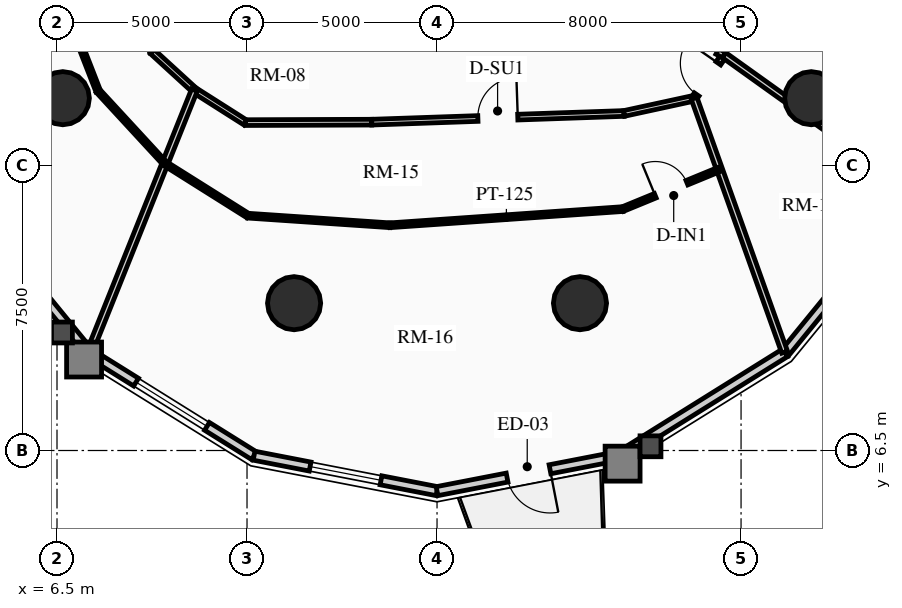
"""IFC4 building model, lengths in metres.
Left out: names, types, materials, properties, quantities, classifications, styles, units other than length and angle.
Written with IfcOpenShell. Run it as: python <this file> out.ifc"""

import sys

from ifc_helpers import new_model, si_unit, direction, frame, frame_2d, origin, origin_2d, place, context, subcontext, project, spatial, rectangle, circle, extrude, source, transform, mapped, element, fill, save


model = new_model("IFC4")
c1 = context("Model", 3, precision=1e-05, world=origin(), true_north=direction((0.0, 1.0)))
c2 = subcontext(c1, "Body", "Model", "MODEL_VIEW")
j1 = project(units=[si_unit("LENGTHUNIT", "METRE"), si_unit("PLANEANGLEUNIT", "RADIAN")], contexts=[c1])
p1 = place(None, origin())
s1 = spatial("IfcSite", under=j1, at=p1, CompositionType="ELEMENT")
p2 = place(p1, origin())
s2 = spatial("IfcBuilding", under=s1, at=p2, CompositionType="ELEMENT")
p3 = place(p2, frame((0.0, 0.0, 110.89)))
s3 = spatial("IfcBuildingStorey", under=s2, at=p3, CompositionType="ELEMENT", Elevation=110.89)
for number, where, z_axis, x_axis in (
    (1, (6.653, 15.771, 0.0), (0.0, 0.0, 1.0), (1.0, 0.0, 0.0)),
    (2, (12.739, 10.377, 0.0), (0.0, 0.0, 1.0), (1.0, 0.0, 0.0)),
    (3, (20.261, 10.377, 0.0), (0.0, 0.0, 1.0), (1.0, 0.0, 0.0)),
    (4, (26.347, 15.771, 0.0), (0.0, 0.0, 1.0), (1.0, 0.0, 0.0)),
):
    element("IfcColumn", number, at=place(p3, frame(where, z_axis=z_axis, x_axis=x_axis)), inside=s3, PredefinedType="USERDEFINED", context=c2, shape_type="SweptSolid", body=[
        extrude(circle(Radius=0.7, at=origin_2d()), origin(), (0.0, 0.0, 1.0), 2.91),
    ])
p4 = place(p3, frame((7.342, 9.072, 0.0), z_axis=(0.0, 0.0, 1.0), x_axis=(-0.632700781152, 0.77439635945, 0.0)))
e5 = element("IfcWall", 5, at=p4, inside=s3, PredefinedType="SOLIDWALL", context=c2, shape_type="SweptSolid", body=[
    extrude(rectangle(XDim=5.448, YDim=0.24, at=frame_2d((2.724, 0.0))), origin(), (0.0, 0.0, 1.0), 2.179),
])
p5 = place(p3, frame((11.685, 6.363, 0.0), z_axis=(0.0, 0.0, 1.0), x_axis=(-0.848520380187, 0.529162701263, 0.0)))
e6 = element("IfcWall", 6, at=p5, inside=s3, PredefinedType="SOLIDWALL", context=c2, shape_type="SweptSolid", body=[
    extrude(rectangle(XDim=5.119, YDim=0.24, at=frame_2d((2.56, 0.0))), origin(), (0.0, 0.0, 1.0), 2.179),
])
m1 = source(origin(), c2, "Body", "SweptSolid", [
    extrude(rectangle(XDim=2.2, YDim=1.35, at=frame_2d((1.1, 0.675))), frame((0.0, 0.13, 0.0), z_axis=(0.0, -1.0, 0.0), x_axis=(1.0, 0.0, 0.0)), (0.0, 0.0, 1.0), 0.26),
])
p6 = place(p5, frame((1.459, 0.0, 0.65)))
e7 = element("IfcOpeningElement", 7, at=p6, cuts=e6, PredefinedType="OPENING", context=c2, shape_type="MappedRepresentation", body=[
    mapped(m1, transform((0.0, 0.0, 0.0), x_axis=(1.0, 0.0, 0.0), y_axis=(0.0, 1.0, 0.0), z_axis=(0.0, 0.0, 1.0), scale=1.0)),
])
p7 = place(p3, frame((16.5, 5.43, 0.0), z_axis=(0.0, 0.0, 1.0), x_axis=(-0.981723785992, 0.190311344954, 0.0)))
e8 = element("IfcWall", 8, at=p7, inside=s3, PredefinedType="SOLIDWALL", context=c2, shape_type="SweptSolid", body=[
    extrude(rectangle(XDim=4.904, YDim=0.24, at=frame_2d((2.452, 0.0))), origin(), (0.0, 0.0, 1.0), 2.179),
])
m2 = source(origin(), c2, "Body", "SweptSolid", [
    extrude(rectangle(XDim=1.9, YDim=1.35, at=frame_2d((0.95, 0.675))), frame((0.0, 0.13, 0.0), z_axis=(0.0, -1.0, 0.0), x_axis=(1.0, 0.0, 0.0)), (0.0, 0.0, 1.0), 0.26),
])
p8 = place(p7, frame((1.502, 0.0, 0.65)))
e9 = element("IfcOpeningElement", 9, at=p8, cuts=e8, PredefinedType="OPENING", context=c2, shape_type="MappedRepresentation", body=[
    mapped(m2, transform((0.0, 0.0, 0.0), x_axis=(1.0, 0.0, 0.0), y_axis=(0.0, 1.0, 0.0), z_axis=(0.0, 0.0, 1.0), scale=1.0)),
])
p9 = place(p3, frame((21.315, 6.363, 0.0), z_axis=(0.0, 0.0, 1.0), x_axis=(-0.981723785992, -0.190311344954, 0.0)))
e10 = element("IfcWall", 10, at=p9, inside=s3, PredefinedType="SOLIDWALL", context=c2, shape_type="SweptSolid", body=[
    extrude(rectangle(XDim=4.904, YDim=0.24, at=frame_2d((2.452, 0.0))), origin(), (0.0, 0.0, 1.0), 2.179),
])
m3 = source(origin(), c2, "Body", "SweptSolid", [
    extrude(rectangle(XDim=1.15, YDim=2.005, at=frame_2d((0.575, 1.002))), frame((0.0, 0.13, 0.0), z_axis=(0.0, -1.0, 0.0), x_axis=(1.0, 0.0, 0.0)), (0.0, 0.0, 1.0), 0.26),
])
p10 = place(p9, frame((1.877, 0.0, 0.0)))
e11 = element("IfcOpeningElement", 11, at=p10, cuts=e10, PredefinedType="OPENING", context=c2, shape_type="MappedRepresentation", body=[
    mapped(m3, transform((0.0, 0.0, 0.0), x_axis=(1.0, 0.0, 0.0), y_axis=(0.0, 1.0, 0.0), z_axis=(0.0, 0.0, 1.0), scale=1.0)),
])
p11 = place(p3, frame((25.658, 9.072, 0.0), z_axis=(0.0, 0.0, 1.0), x_axis=(-0.848520380187, -0.529162701263, 0.0)))
e12 = element("IfcWall", 12, at=p11, inside=s3, PredefinedType="SOLIDWALL", context=c2, shape_type="SweptSolid", body=[
    extrude(rectangle(XDim=5.119, YDim=0.24, at=frame_2d((2.56, 0.0))), origin(), (0.0, 0.0, 1.0), 2.179),
])
p12 = place(p3, frame((29.105, 13.291, 0.0), z_axis=(0.0, 0.0, 1.0), x_axis=(-0.632700781152, -0.77439635945, 0.0)))
e13 = element("IfcWall", 13, at=p12, inside=s3, PredefinedType="SOLIDWALL", context=c2, shape_type="SweptSolid", body=[
    extrude(rectangle(XDim=5.448, YDim=0.24, at=frame_2d((2.724, 0.0))), origin(), (0.0, 0.0, 1.0), 2.179),
])
p13 = place(p12, frame((1.774, 0.0, 0.65)))
e14 = element("IfcOpeningElement", 14, at=p13, cuts=e13, PredefinedType="OPENING", context=c2, shape_type="MappedRepresentation", body=[
    mapped(m2, transform((0.0, 0.0, 0.0), x_axis=(1.0, 0.0, 0.0), y_axis=(0.0, 1.0, 0.0), z_axis=(0.0, 0.0, 1.0), scale=1.0)),
])
p14 = place(p3, frame((8.538, 18.338, 0.0), z_axis=(0.0, 0.0, 1.0), x_axis=(0.331358150167, -0.94350504838, 0.0)))
e15 = element("IfcWall", 15, at=p14, inside=s3, PredefinedType="PARTITIONING", context=c2, shape_type="SweptSolid", body=[
    extrude(rectangle(XDim=1.424, YDim=0.15, at=frame_2d((0.712, 0.0))), origin(), (0.0, 0.0, 1.0), 2.225),
])
m4 = source(origin(), c2, "Body", "SweptSolid", [
    extrude(rectangle(XDim=1.05, YDim=2.015, at=frame_2d((0.525, 1.007))), frame((0.0, 0.085, 0.0), z_axis=(0.0, -1.0, 0.0), x_axis=(1.0, 0.0, 0.0)), (0.0, 0.0, 1.0), 0.17),
])
p15 = place(p14, frame((0.12, 0.0, 0.0)))
e16 = element("IfcOpeningElement", 16, at=p15, cuts=e15, PredefinedType="OPENING", context=c2, shape_type="MappedRepresentation", body=[
    mapped(m4, transform((0.0, 0.0, 0.0), x_axis=(1.0, 0.0, 0.0), y_axis=(0.0, 1.0, 0.0), z_axis=(0.0, 0.0, 1.0), scale=1.0)),
])
p16 = place(p3, frame((9.01, 16.994, 0.0), z_axis=(0.0, 0.0, 1.0), x_axis=(0.737701798986, -0.67512669609, 0.0)))
e17 = element("IfcWall", 17, at=p16, inside=s3, PredefinedType="PARTITIONING", context=c2, shape_type="SweptSolid", body=[
    extrude(rectangle(XDim=1.498, YDim=0.15, at=frame_2d((0.749, 0.0))), origin(), (0.0, 0.0, 1.0), 2.225),
])
p17 = place(p3, frame((10.115, 15.983, 0.0), z_axis=(0.0, 0.0, 1.0), x_axis=(0.843995849351, -0.536349705209, 0.0)))
e18 = element("IfcWall", 18, at=p17, inside=s3, PredefinedType="PARTITIONING", context=c2, shape_type="SweptSolid", body=[
    extrude(rectangle(XDim=1.593, YDim=0.15, at=frame_2d((0.796, 0.0))), origin(), (0.0, 0.0, 1.0), 2.225),
])
p18 = place(p3, frame((11.46, 15.129, 0.0), z_axis=(0.0, 0.0, 1.0), x_axis=(0.999993513287, 0.003601858435, 0.0)))
e19 = element("IfcWall", 19, at=p18, inside=s3, PredefinedType="PARTITIONING", context=c2, shape_type="SweptSolid", body=[
    extrude(rectangle(XDim=3.321, YDim=0.15, at=frame_2d((1.661, 0.0))), origin(), (0.0, 0.0, 1.0), 2.225),
])
p19 = place(p3, frame((14.781, 15.141, 0.0), z_axis=(0.0, 0.0, 1.0), x_axis=(0.999407918707, 0.034406569513, 0.0)))
e20 = element("IfcWall", 20, at=p19, inside=s3, PredefinedType="PARTITIONING", context=c2, shape_type="SweptSolid", body=[
    extrude(rectangle(XDim=6.642, YDim=0.15, at=frame_2d((3.321, 0.0))), origin(), (0.0, 0.0, 1.0), 2.225),
])
p20 = place(p19, frame((2.796, 0.0, 0.0)))
e21 = element("IfcOpeningElement", 21, at=p20, cuts=e20, PredefinedType="OPENING", context=c2, shape_type="MappedRepresentation", body=[
    mapped(m4, transform((0.0, 0.0, 0.0), x_axis=(1.0, 0.0, 0.0), y_axis=(0.0, 1.0, 0.0), z_axis=(0.0, 0.0, 1.0), scale=1.0)),
])
p21 = place(p3, frame((21.419, 15.369, 0.0), z_axis=(0.0, 0.0, 1.0), x_axis=(0.977192701953, 0.212354475464, 0.0)))
e22 = element("IfcWall", 22, at=p21, inside=s3, PredefinedType="PARTITIONING", context=c2, shape_type="SweptSolid", body=[
    extrude(rectangle(XDim=1.888, YDim=0.15, at=frame_2d((0.944, 0.0))), origin(), (0.0, 0.0, 1.0), 2.225),
])
p22 = place(p3, frame((23.263, 15.77, 0.0), z_axis=(0.0, 0.0, 1.0), x_axis=(0.570743456919, 0.821128434768, 0.0)))
e23 = element("IfcWall", 23, at=p22, inside=s3, PredefinedType="PARTITIONING", context=c2, shape_type="SweptSolid", body=[
    extrude(rectangle(XDim=1.382, YDim=0.15, at=frame_2d((0.691, 0.0))), origin(), (0.0, 0.0, 1.0), 2.225),
])
m5 = source(origin(), c2, "Body", "SweptSolid", [
    extrude(rectangle(XDim=1.0, YDim=2.015, at=frame_2d((0.5, 1.007))), frame((0.0, 0.085, 0.0), z_axis=(0.0, -1.0, 0.0), x_axis=(1.0, 0.0, 0.0)), (0.0, 0.0, 1.0), 0.17),
])
p23 = place(p22, frame((0.12, 0.0, 0.0)))
e24 = element("IfcOpeningElement", 24, at=p23, cuts=e23, PredefinedType="OPENING", context=c2, shape_type="MappedRepresentation", body=[
    mapped(m5, transform((0.0, 0.0, 0.0), x_axis=(1.0, 0.0, 0.0), y_axis=(0.0, 1.0, 0.0), z_axis=(0.0, 0.0, 1.0), scale=1.0)),
])
p24 = place(p3, frame((10.115, 15.983, 0.0), z_axis=(0.0, 0.0, 1.0), x_axis=(-0.371861013147, -0.928288417951, 0.0)))
e25 = element("IfcWall", 25, at=p24, inside=s3, PredefinedType="PARTITIONING", context=c2, shape_type="SweptSolid", body=[
    extrude(rectangle(XDim=7.427, YDim=0.16, at=frame_2d((3.714, 0.0))), origin(), (0.0, 0.0, 1.0), 2.179),
])
p25 = place(p3, frame((23.263, 15.77, 0.0), z_axis=(0.0, 0.0, 1.0), x_axis=(0.335919964206, -0.941890533793, 0.0)))
e26 = element("IfcWall", 26, at=p25, inside=s3, PredefinedType="PARTITIONING", context=c2, shape_type="SweptSolid", body=[
    extrude(rectangle(XDim=7.094, YDim=0.16, at=frame_2d((3.547, 0.0))), origin(), (0.0, 0.0, 1.0), 2.179),
])
p26 = place(p3, frame((24.052, 16.905, 0.0), z_axis=(0.0, 0.0, 1.0), x_axis=(0.813437670746, -0.581652091727, 0.0)))
e27 = element("IfcWall", 27, at=p26, inside=s3, PredefinedType="PARTITIONING", context=c2, shape_type="SweptSolid", body=[
    extrude(rectangle(XDim=6.192, YDim=0.16, at=frame_2d((3.096, 0.0))), origin(), (0.0, 0.0, 1.0), 2.179),
])
p27 = place(p3, frame((22.075, 17.975, 0.0), z_axis=(0.0, 0.0, 1.0), x_axis=(0.879356383302, -0.476164206073, 0.0)))
e28 = element("IfcWall", 28, at=p27, inside=s3, PredefinedType="PARTITIONING", context=c2, shape_type="SweptSolid", body=[
    extrude(rectangle(XDim=2.248, YDim=0.16, at=frame_2d((1.124, 0.0))), origin(), (0.0, 0.0, 1.0), 2.225),
])
m6 = source(origin(), c2, "Body", "SweptSolid", [
    extrude(rectangle(XDim=1.05, YDim=2.015, at=frame_2d((0.525, 1.007))), frame((0.0, 0.09, 0.0), z_axis=(0.0, -1.0, 0.0), x_axis=(1.0, 0.0, 0.0)), (0.0, 0.0, 1.0), 0.18),
])
p28 = place(p27, frame((0.998, 0.0, 0.0)))
e29 = element("IfcOpeningElement", 29, at=p28, cuts=e28, PredefinedType="OPENING", context=c2, shape_type="MappedRepresentation", body=[
    mapped(m6, transform((0.0, 0.0, 0.0), x_axis=(1.0, 0.0, 0.0), y_axis=(0.0, 1.0, 0.0), z_axis=(0.0, 0.0, 1.0), scale=1.0)),
])
p29 = place(p3, frame((6.624, 18.415, 0.0), z_axis=(0.0, 0.0, 1.0), x_axis=(0.363854295337, -0.931455877519, 0.0)))
e30 = element("IfcWall", 30, at=p29, inside=s3, PredefinedType="PARTITIONING", context=c2, shape_type="SweptSolid", body=[
    extrude(rectangle(XDim=2.635, YDim=0.125, at=frame_2d((1.317, 0.0))), origin(), (0.0, 0.0, 1.0), 2.225),
])
p30 = place(p3, frame((7.583, 15.961, 0.0), z_axis=(0.0, 0.0, 1.0), x_axis=(0.677838563189, -0.735210774032, 0.0)))
e31 = element("IfcWall", 31, at=p30, inside=s3, PredefinedType="PARTITIONING", context=c2, shape_type="SweptSolid", body=[
    extrude(rectangle(XDim=2.596, YDim=0.125, at=frame_2d((1.298, 0.0))), origin(), (0.0, 0.0, 1.0), 2.655),
])
p31 = place(p3, frame((9.342, 14.052, 0.0), z_axis=(0.0, 0.0, 1.0), x_axis=(0.846526826244, -0.532346064557, 0.0)))
e32 = element("IfcWall", 32, at=p31, inside=s3, PredefinedType="PARTITIONING", context=c2, shape_type="SweptSolid", body=[
    extrude(rectangle(XDim=2.578, YDim=0.125, at=frame_2d((1.289, 0.0))), origin(), (0.0, 0.0, 1.0), 2.225),
])
p32 = place(p3, frame((11.525, 12.68, 0.0), z_axis=(0.0, 0.0, 1.0), x_axis=(0.997726815836, -0.067388433443, 0.0)))
e33 = element("IfcWall", 33, at=p32, inside=s3, PredefinedType="PARTITIONING", context=c2, shape_type="SweptSolid", body=[
    extrude(rectangle(XDim=3.746, YDim=0.125, at=frame_2d((1.873, 0.0))), origin(), (0.0, 0.0, 1.0), 2.225),
])
p33 = place(p3, frame((15.262, 12.427, 0.0), z_axis=(0.0, 0.0, 1.0), x_axis=(0.997595855995, 0.069300130605, 0.0)))
e34 = element("IfcWall", 34, at=p33, inside=s3, PredefinedType="PARTITIONING", context=c2, shape_type="SweptSolid", body=[
    extrude(rectangle(XDim=6.14, YDim=0.125, at=frame_2d((3.07, 0.0))), origin(), (0.0, 0.0, 1.0), 2.225),
])
p34 = place(p3, frame((21.388, 12.853, 0.0), z_axis=(0.0, 0.0, 1.0), x_axis=(0.924757149715, 0.380557767036, 0.0)))
e35 = element("IfcWall", 35, at=p34, inside=s3, PredefinedType="PARTITIONING", context=c2, shape_type="SweptSolid", body=[
    extrude(rectangle(XDim=2.75, YDim=0.125, at=frame_2d((1.375, 0.0))), origin(), (0.0, 0.0, 1.0), 2.179),
])
m7 = source(origin(), c2, "Body", "SweptSolid", [
    extrude(rectangle(XDim=0.9, YDim=2.005, at=frame_2d((0.45, 1.002))), frame((0.0, 0.073, 0.0), z_axis=(0.0, -1.0, 0.0), x_axis=(1.0, 0.0, 0.0)), (0.0, 0.0, 1.0), 0.145),
])
p35 = place(p34, frame((0.925, 0.0, 0.0)))
e36 = element("IfcOpeningElement", 36, at=p35, cuts=e35, PredefinedType="OPENING", context=c2, shape_type="MappedRepresentation", body=[
    mapped(m7, transform((0.0, 0.0, 0.0), x_axis=(1.0, 0.0, 0.0), y_axis=(0.0, 1.0, 0.0), z_axis=(0.0, 0.0, 1.0), scale=1.0)),
])
m8 = source(origin(), c2, "Body", "SweptSolid", [
    extrude(rectangle(XDim=2.2, YDim=1.35, at=frame_2d((1.1, 0.675))), frame((0.0, 0.03, 0.0), z_axis=(0.0, -1.0, 0.0), x_axis=(1.0, 0.0, 0.0)), (0.0, 0.0, 1.0), 0.06),
])
p36 = place(p6, origin())
e37 = element("IfcWindow", 37, at=p36, inside=s3, PartitioningType="DOUBLE_PANEL_VERTICAL", PredefinedType="WINDOW", context=c2, shape_type="MappedRepresentation", body=[
    mapped(m8, transform((0.0, 0.0, 0.0), x_axis=(1.0, 0.0, 0.0), y_axis=(0.0, 1.0, 0.0), z_axis=(0.0, 0.0, 1.0), scale=1.0)),
])
fill(e7, e37)
m9 = source(origin(), c2, "Body", "SweptSolid", [
    extrude(rectangle(XDim=1.9, YDim=1.35, at=frame_2d((0.95, 0.675))), frame((0.0, 0.03, 0.0), z_axis=(0.0, -1.0, 0.0), x_axis=(1.0, 0.0, 0.0)), (0.0, 0.0, 1.0), 0.06),
])
p37 = place(p8, origin())
e38 = element("IfcWindow", 38, at=p37, inside=s3, PartitioningType="DOUBLE_PANEL_VERTICAL", PredefinedType="WINDOW", context=c2, shape_type="MappedRepresentation", body=[
    mapped(m9, transform((0.0, 0.0, 0.0), x_axis=(1.0, 0.0, 0.0), y_axis=(0.0, 1.0, 0.0), z_axis=(0.0, 0.0, 1.0), scale=1.0)),
])
fill(e9, e38)
m10 = source(origin(), c2, "Body", "SweptSolid", [
    extrude(rectangle(XDim=1.15, YDim=2.005, at=frame_2d((0.575, 1.002))), frame((0.0, 0.025, 0.0), z_axis=(0.0, -1.0, 0.0), x_axis=(1.0, 0.0, 0.0)), (0.0, 0.0, 1.0), 0.05),
])
p38 = place(p10, origin())
e39 = element("IfcDoor", 39, at=p38, inside=s3, OperationType="SINGLE_SWING_LEFT", PredefinedType="DOOR", context=c2, shape_type="MappedRepresentation", body=[
    mapped(m10, transform((0.0, 0.0, 0.0), x_axis=(1.0, 0.0, 0.0), y_axis=(0.0, 1.0, 0.0), z_axis=(0.0, 0.0, 1.0), scale=1.0)),
])
fill(e11, e39)
m11 = source(origin(), c2, "Body", "SweptSolid", [
    extrude(rectangle(XDim=1.05, YDim=2.015, at=frame_2d((0.525, 1.007))), frame((0.0, 0.025, 0.0), z_axis=(0.0, -1.0, 0.0), x_axis=(1.0, 0.0, 0.0)), (0.0, 0.0, 1.0), 0.05),
])
p39 = place(p28, origin())
e40 = element("IfcDoor", 40, at=p39, inside=s3, OperationType="SINGLE_SWING_RIGHT", PredefinedType="DOOR", context=c2, shape_type="MappedRepresentation", body=[
    mapped(m11, transform((0.0, 0.0, 0.0), x_axis=(1.0, 0.0, 0.0), y_axis=(0.0, 1.0, 0.0), z_axis=(0.0, 0.0, 1.0), scale=1.0)),
])
fill(e29, e40)
p40 = place(p20, origin())
e41 = element("IfcDoor", 41, at=p40, inside=s3, OperationType="SINGLE_SWING_RIGHT", PredefinedType="DOOR", context=c2, shape_type="MappedRepresentation", body=[
    mapped(m11, transform((0.0, 0.0, 0.0), x_axis=(1.0, 0.0, 0.0), y_axis=(0.0, 1.0, 0.0), z_axis=(0.0, 0.0, 1.0), scale=1.0)),
])
fill(e21, e41)
m12 = source(origin(), c2, "Body", "SweptSolid", [
    extrude(rectangle(XDim=0.9, YDim=2.005, at=frame_2d((0.45, 1.002))), frame((0.0, 0.025, 0.0), z_axis=(0.0, -1.0, 0.0), x_axis=(1.0, 0.0, 0.0)), (0.0, 0.0, 1.0), 0.05),
])
p41 = place(p35, origin())
e42 = element("IfcDoor", 42, at=p41, inside=s3, OperationType="SINGLE_SWING_LEFT", PredefinedType="DOOR", context=c2, shape_type="MappedRepresentation", body=[
    mapped(m12, transform((0.0, 0.0, 0.0), x_axis=(1.0, 0.0, 0.0), y_axis=(0.0, 1.0, 0.0), z_axis=(0.0, 0.0, 1.0), scale=1.0)),
])
fill(e36, e42)
m13 = source(origin(), c2, "Body", "SweptSolid", [
    extrude(rectangle(XDim=1.0, YDim=2.015, at=frame_2d((0.5, 1.007))), frame((0.0, 0.025, 0.0), z_axis=(0.0, -1.0, 0.0), x_axis=(1.0, 0.0, 0.0)), (0.0, 0.0, 1.0), 0.05),
])
p42 = place(p23, origin())
e43 = element("IfcDoor", 43, at=p42, inside=s3, OperationType="SINGLE_SWING_RIGHT", PredefinedType="DOOR", context=c2, shape_type="MappedRepresentation", body=[
    mapped(m13, transform((0.0, 0.0, 0.0), x_axis=(1.0, 0.0, 0.0), y_axis=(0.0, 1.0, 0.0), z_axis=(0.0, 0.0, 1.0), scale=1.0)),
])
fill(e24, e43)
save(model, sys.argv[1])
